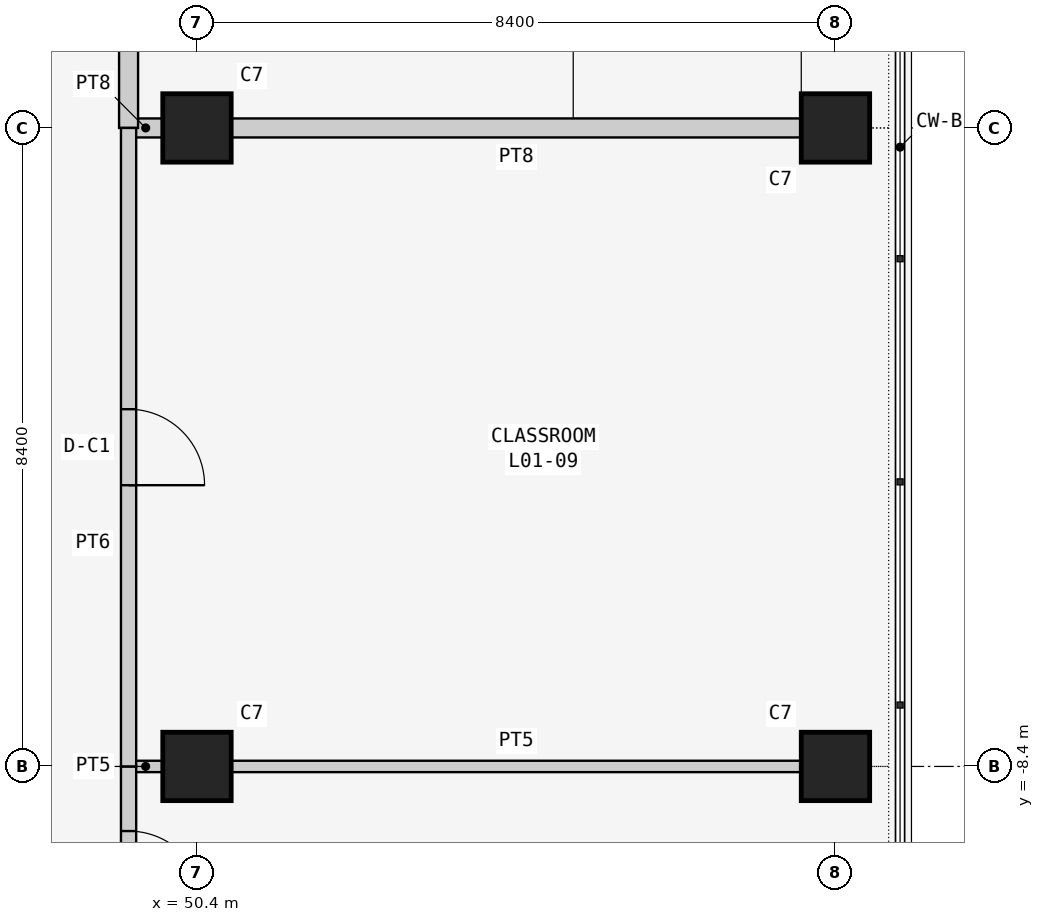
"""IFC4 building model, lengths in metres.
Left out: names, types, materials, properties, quantities, classifications, styles, units other than length and angle.
Written with IfcOpenShell. Run it as: python <this file> out.ifc"""

import sys

from ifc_helpers import new_model, si_unit, direction, frame, frame_2d, origin, origin_2d, place, context, subcontext, project, spatial, rectangle, extrude, element, fill, save


model = new_model("IFC4")
c1 = context("Model", 3, precision=1e-05, world=origin(), true_north=direction((0.0, 1.0)))
c2 = subcontext(c1, "Body", "Model", "MODEL_VIEW")
j1 = project(units=[si_unit("LENGTHUNIT", "METRE"), si_unit("PLANEANGLEUNIT", "RADIAN")], contexts=[c1])
p1 = place(None, origin())
s1 = spatial("IfcSite", under=j1, at=p1, CompositionType="ELEMENT")
p2 = place(p1, origin())
s2 = spatial("IfcBuilding", under=s1, at=p2, CompositionType="ELEMENT")
p3 = place(p2, frame((0.0, 0.0, 6.0)))
s3 = spatial("IfcBuildingStorey", under=s2, at=p3, CompositionType="ELEMENT", Elevation=6.0)
for number, where, z_axis, x_axis in (
    (1, (50.4, -8.4, 0.0), (0.0, 0.0, 1.0), (1.0, 0.0, 0.0)),
    (2, (50.4, 0.0, 0.0), (0.0, 0.0, 1.0), (1.0, 0.0, 0.0)),
    (3, (58.8, -8.4, 0.0), (0.0, 0.0, 1.0), (1.0, 0.0, 0.0)),
    (4, (58.8, 0.0, 0.0), (0.0, 0.0, 1.0), (1.0, 0.0, 0.0)),
):
    element("IfcColumn", number, at=place(p3, frame(where, z_axis=z_axis, x_axis=x_axis)), inside=s3, PredefinedType="COLUMN", context=c2, shape_type="SweptSolid", body=[
        extrude(rectangle(XDim=0.9, YDim=0.9, at=origin_2d()), origin(), (0.0, 0.0, 1.0), 4.5),
    ])
p4 = place(p3, frame((49.95, 0.0, 0.0), z_axis=(0.0, 0.0, 1.0), x_axis=(-1.0, 0.0, 0.0)))
e5 = element("IfcWall", 5, at=p4, inside=s3, PredefinedType="SOLIDWALL", context=c2, shape_type="SweptSolid", body=[
    extrude(rectangle(XDim=0.45, YDim=0.25, at=frame_2d((0.225, 0.0))), origin(), (0.0, 0.0, 1.0), 3.543),
])
p5 = place(p3, frame((58.35, 0.0, 0.0), z_axis=(0.0, 0.0, 1.0), x_axis=(-1.0, 0.0, 0.0)))
e6 = element("IfcWall", 6, at=p5, inside=s3, PredefinedType="SOLIDWALL", context=c2, shape_type="SweptSolid", body=[
    extrude(rectangle(XDim=7.5, YDim=0.25, at=frame_2d((3.75, 0.0))), origin(), (0.0, 0.0, 1.0), 3.543),
])
p6 = place(p3, frame((49.5, 0.0, 0.0), z_axis=(0.0, 0.0, 1.0), x_axis=(0.0, 1.0, 0.0)))
e7 = element("IfcWall", 7, at=p6, inside=s3, PredefinedType="SOLIDWALL", context=c2, shape_type="SweptSolid", body=[
    extrude(rectangle(XDim=8.4, YDim=0.25, at=frame_2d((4.2, 0.0))), origin(), (0.0, 0.0, 1.0), 4.3),
])
p7 = place(p6, frame((3.6, 0.0, 0.0)))
e8 = element("IfcOpeningElement", 8, at=p7, cuts=e7, PredefinedType="OPENING", context=c2, shape_type="SweptSolid", body=[
    extrude(rectangle(XDim=1.2, YDim=2.1, at=frame_2d((0.6, 1.05))), frame((0.0, 0.135, 0.0), z_axis=(0.0, -1.0, 0.0), x_axis=(1.0, 0.0, 0.0)), (0.0, 0.0, 1.0), 0.27),
])
p8 = place(p3, frame((49.5, -8.4, 0.0), z_axis=(0.0, 0.0, 1.0), x_axis=(1.0, 0.0, 0.0)))
e9 = element("IfcWall", 9, at=p8, inside=s3, PredefinedType="PARTITIONING", context=c2, shape_type="SweptSolid", body=[
    extrude(rectangle(XDim=0.45, YDim=0.15, at=frame_2d((0.225, 0.0))), origin(), (0.0, 0.0, 1.0), 3.543),
])
p9 = place(p3, frame((50.85, -8.4, 0.0), z_axis=(0.0, 0.0, 1.0), x_axis=(1.0, 0.0, 0.0)))
e10 = element("IfcWall", 10, at=p9, inside=s3, PredefinedType="PARTITIONING", context=c2, shape_type="SweptSolid", body=[
    extrude(rectangle(XDim=7.5, YDim=0.15, at=frame_2d((3.75, 0.0))), origin(), (0.0, 0.0, 1.0), 3.543),
])
p10 = place(p3, frame((49.5, -11.1, 0.0), z_axis=(0.0, 0.0, 1.0), x_axis=(0.0, 1.0, 0.0)))
e11 = element("IfcWall", 11, at=p10, inside=s3, PredefinedType="PARTITIONING", context=c2, shape_type="SweptSolid", body=[
    extrude(rectangle(XDim=2.7, YDim=0.2, at=frame_2d((1.35, 0.0))), origin(), (0.0, 0.0, 1.0), 4.3),
])
p11 = place(p10, frame((0.85, 0.0, 0.0)))
e12 = element("IfcOpeningElement", 12, at=p11, cuts=e11, PredefinedType="OPENING", context=c2, shape_type="SweptSolid", body=[
    extrude(rectangle(XDim=1.0, YDim=2.1, at=frame_2d((0.5, 1.05))), frame((0.0, 0.11, 0.0), z_axis=(0.0, -1.0, 0.0), x_axis=(1.0, 0.0, 0.0)), (0.0, 0.0, 1.0), 0.22),
])
p12 = place(p3, frame((49.5, -8.4, 0.0), z_axis=(0.0, 0.0, 1.0), x_axis=(0.0, 1.0, 0.0)))
e13 = element("IfcWall", 13, at=p12, inside=s3, PredefinedType="PARTITIONING", context=c2, shape_type="SweptSolid", body=[
    extrude(rectangle(XDim=8.4, YDim=0.2, at=frame_2d((4.2, 0.0))), origin(), (0.0, 0.0, 1.0), 4.3),
])
p13 = place(p12, frame((3.7, 0.0, 0.0)))
e14 = element("IfcOpeningElement", 14, at=p13, cuts=e13, PredefinedType="OPENING", context=c2, shape_type="SweptSolid", body=[
    extrude(rectangle(XDim=1.0, YDim=2.1, at=frame_2d((0.5, 1.05))), frame((0.0, 0.11, 0.0), z_axis=(0.0, -1.0, 0.0), x_axis=(1.0, 0.0, 0.0)), (0.0, 0.0, 1.0), 0.22),
])
p14 = place(p11, frame((1.0, 0.0, 0.0), z_axis=(0.0, 0.0, 1.0), x_axis=(-1.0, 0.0, 0.0)))
e15 = element("IfcDoor", 15, at=p14, inside=s3, OperationType="SINGLE_SWING_RIGHT", PredefinedType="DOOR", context=c2, shape_type="SweptSolid", body=[
    extrude(rectangle(XDim=1.0, YDim=2.1, at=frame_2d((0.5, 1.05))), frame((0.0, 0.025, 0.0), z_axis=(0.0, -1.0, 0.0), x_axis=(1.0, 0.0, 0.0)), (0.0, 0.0, 1.0), 0.05),
])
fill(e12, e15)
p15 = place(p13, frame((1.0, 0.0, 0.0), z_axis=(0.0, 0.0, 1.0), x_axis=(-1.0, 0.0, 0.0)))
e16 = element("IfcDoor", 16, at=p15, inside=s3, OperationType="SINGLE_SWING_RIGHT", PredefinedType="DOOR", context=c2, shape_type="SweptSolid", body=[
    extrude(rectangle(XDim=1.0, YDim=2.1, at=frame_2d((0.5, 1.05))), frame((0.0, 0.025, 0.0), z_axis=(0.0, -1.0, 0.0), x_axis=(1.0, 0.0, 0.0)), (0.0, 0.0, 1.0), 0.05),
])
fill(e14, e16)
save(model, sys.argv[1])
